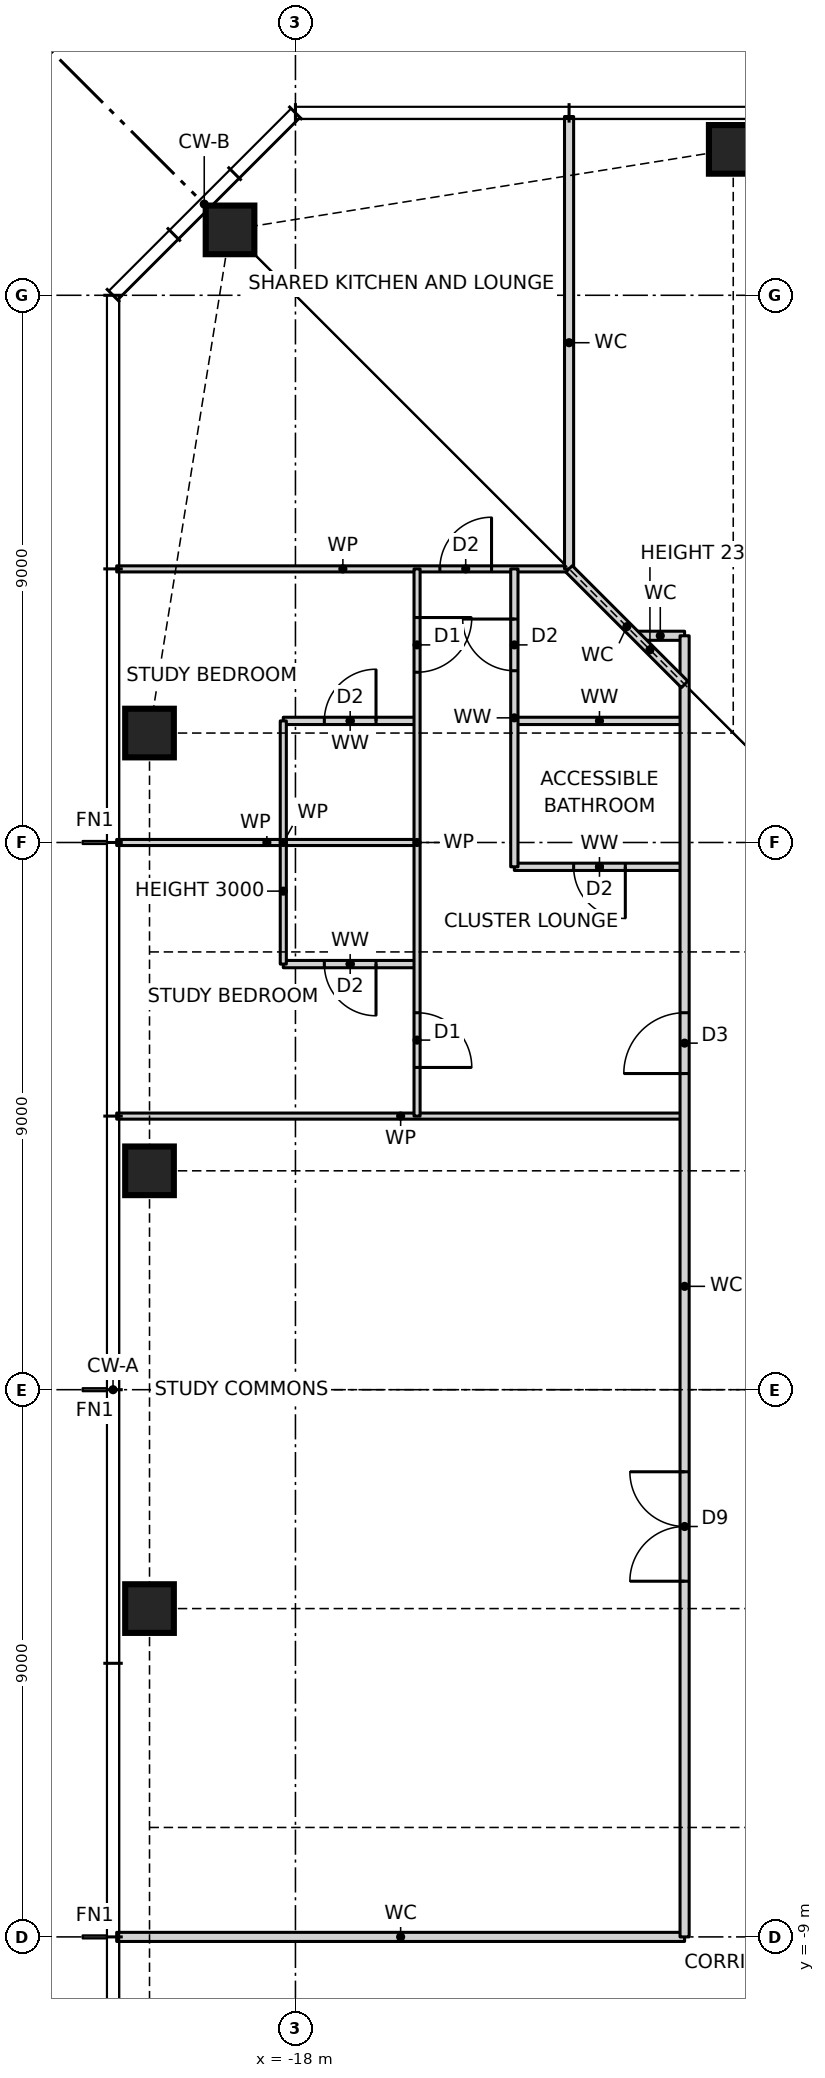
"""IFC4 building model, lengths in metres.
Left out: names, types, materials, properties, quantities, classifications, styles, units other than length and angle.
Written with IfcOpenShell. Run it as: python <this file> out.ifc"""

import sys

from ifc_helpers import new_model, si_unit, direction, frame, frame_2d, origin, origin_2d, place, context, subcontext, project, spatial, rectangle, hollow_rectangle, extrude, element, fill, save


model = new_model("IFC4")
c1 = context("Model", 3, precision=1e-05, world=origin(), true_north=direction((0.0, 1.0)))
c2 = subcontext(c1, "Body", "Model", "MODEL_VIEW")
j1 = project(units=[si_unit("LENGTHUNIT", "METRE"), si_unit("PLANEANGLEUNIT", "RADIAN")], contexts=[c1])
p1 = place(None, origin())
s1 = spatial("IfcSite", under=j1, at=p1, CompositionType="ELEMENT")
p2 = place(p1, origin())
s2 = spatial("IfcBuilding", under=s1, at=p2, CompositionType="ELEMENT")
p3 = place(p2, frame((0.0, 0.0, 122.5)))
s3 = spatial("IfcBuildingStorey", under=s2, at=p3, CompositionType="ELEMENT", Elevation=122.5)
for number, where, z_axis, x_axis in (
    (1, (-10.8, 20.4, 0.0), (0.0, 0.0, 1.0), (1.0, 0.0, 0.0)),
    (2, (-19.076, 19.076, 0.0), (0.0, 0.0, 1.0), (1.0, 0.0, 0.0)),
    (3, (-20.4, 10.8, 0.0), (0.0, 0.0, 1.0), (1.0, 0.0, 0.0)),
    (4, (-20.4, 3.6, 0.0), (0.0, 0.0, 1.0), (1.0, 0.0, 0.0)),
    (5, (-20.4, -3.6, 0.0), (0.0, 0.0, 1.0), (1.0, 0.0, 0.0)),
):
    element("IfcColumn", number, at=place(p3, frame(where, z_axis=z_axis, x_axis=x_axis)), inside=s3, PredefinedType="COLUMN", context=c2, shape_type="SweptSolid", body=[
        extrude(hollow_rectangle(XDim=0.8, YDim=0.8, WallThickness=0.07, at=origin_2d()), origin(), (0.0, 0.0, 1.0), 3.5),
    ])
p4 = place(p3, frame((-20.94, -9.0, 0.0), z_axis=(0.0, 0.0, 1.0), x_axis=(1.0, 0.0, 0.0)))
e6 = element("IfcWall", 6, at=p4, inside=s3, PredefinedType="PARTITIONING", context=c2, shape_type="SweptSolid", body=[
    extrude(rectangle(XDim=9.34, YDim=0.15, at=frame_2d((4.67, 0.0))), origin(), (0.0, 0.0, 1.0), 3.27),
])
p5 = place(p3, frame((-20.94, 4.5, 0.0), z_axis=(0.0, 0.0, 1.0), x_axis=(1.0, 0.0, 0.0)))
e7 = element("IfcWall", 7, at=p5, inside=s3, PredefinedType="PARTITIONING", context=c2, shape_type="SweptSolid", body=[
    extrude(rectangle(XDim=9.34, YDim=0.1, at=frame_2d((4.67, 0.0))), origin(), (0.0, 0.0, 1.0), 3.27),
])
p6 = place(p3, frame((-18.2, 7.0, 0.0), z_axis=(0.0, 0.0, 1.0), x_axis=(1.0, 0.0, 0.0)))
e8 = element("IfcWall", 8, at=p6, inside=s3, PredefinedType="PARTITIONING", context=c2, shape_type="SweptSolid", body=[
    extrude(rectangle(XDim=2.2, YDim=0.12, at=frame_2d((1.1, 0.0))), origin(), (0.0, 0.0, 1.0), 3.27),
])
p7 = place(p6, frame((0.675, 0.0, 0.0)))
e9 = element("IfcOpeningElement", 9, at=p7, cuts=e8, PredefinedType="OPENING", context=c2, shape_type="SweptSolid", body=[
    extrude(rectangle(XDim=0.85, YDim=2.1, at=frame_2d((0.425, 1.05))), frame((0.0, 0.07, 0.0), z_axis=(0.0, -1.0, 0.0), x_axis=(1.0, 0.0, 0.0)), (0.0, 0.0, 1.0), 0.14),
])
p8 = place(p3, frame((-14.4, 8.6, 0.0), z_axis=(0.0, 0.0, 1.0), x_axis=(1.0, 0.0, 0.0)))
e10 = element("IfcWall", 10, at=p8, inside=s3, PredefinedType="PARTITIONING", context=c2, shape_type="SweptSolid", body=[
    extrude(rectangle(XDim=2.8, YDim=0.12, at=frame_2d((1.4, 0.0))), origin(), (0.0, 0.0, 1.0), 3.27),
])
p9 = place(p8, frame((0.975, 0.0, 0.0)))
e11 = element("IfcOpeningElement", 11, at=p9, cuts=e10, PredefinedType="OPENING", context=c2, shape_type="SweptSolid", body=[
    extrude(rectangle(XDim=0.85, YDim=2.1, at=frame_2d((0.425, 1.05))), frame((0.0, 0.07, 0.0), z_axis=(0.0, -1.0, 0.0), x_axis=(1.0, 0.0, 0.0)), (0.0, 0.0, 1.0), 0.14),
])
p10 = place(p3, frame((-20.94, 9.0, 0.0), z_axis=(0.0, 0.0, 1.0), x_axis=(1.0, 0.0, 0.0)))
e12 = element("IfcWall", 12, at=p10, inside=s3, PredefinedType="PARTITIONING", context=c2, shape_type="SweptSolid", body=[
    extrude(rectangle(XDim=4.94, YDim=0.1, at=frame_2d((2.47, 0.0))), origin(), (0.0, 0.0, 1.0), 3.27),
])
p11 = place(p3, frame((-18.2, 11.0, 0.0), z_axis=(0.0, 0.0, 1.0), x_axis=(1.0, 0.0, 0.0)))
e13 = element("IfcWall", 13, at=p11, inside=s3, PredefinedType="PARTITIONING", context=c2, shape_type="SweptSolid", body=[
    extrude(rectangle(XDim=2.2, YDim=0.12, at=frame_2d((1.1, 0.0))), origin(), (0.0, 0.0, 1.0), 3.27),
])
p12 = place(p11, frame((0.675, 0.0, 0.0)))
e14 = element("IfcOpeningElement", 14, at=p12, cuts=e13, PredefinedType="OPENING", context=c2, shape_type="SweptSolid", body=[
    extrude(rectangle(XDim=0.85, YDim=2.1, at=frame_2d((0.425, 1.05))), frame((0.0, 0.07, 0.0), z_axis=(0.0, -1.0, 0.0), x_axis=(1.0, 0.0, 0.0)), (0.0, 0.0, 1.0), 0.14),
])
p13 = place(p3, frame((-14.4, 11.0, 0.0), z_axis=(0.0, 0.0, 1.0), x_axis=(1.0, 0.0, 0.0)))
e15 = element("IfcWall", 15, at=p13, inside=s3, PredefinedType="PARTITIONING", context=c2, shape_type="SweptSolid", body=[
    extrude(rectangle(XDim=2.8, YDim=0.12, at=frame_2d((1.4, 0.0))), origin(), (0.0, 0.0, 1.0), 3.27),
])
p14 = place(p3, frame((-12.4, 12.4, 0.0), z_axis=(0.0, 0.0, 1.0), x_axis=(1.0, 0.0, 0.0)))
e16 = element("IfcWall", 16, at=p14, inside=s3, PredefinedType="PARTITIONING", context=c2, shape_type="SweptSolid", body=[
    extrude(rectangle(XDim=0.8, YDim=0.15, at=frame_2d((0.4, 0.0))), origin(), (0.0, 0.0, 1.0), 3.27),
])
p15 = place(p3, frame((-20.94, 13.5, 0.0), z_axis=(0.0, 0.0, 1.0), x_axis=(1.0, 0.0, 0.0)))
e17 = element("IfcWall", 17, at=p15, inside=s3, PredefinedType="PARTITIONING", context=c2, shape_type="SweptSolid", body=[
    extrude(rectangle(XDim=7.44, YDim=0.1, at=frame_2d((3.72, 0.0))), origin(), (0.0, 0.0, 1.0), 3.27),
])
p16 = place(p15, frame((5.315, 0.0, 0.0)))
e18 = element("IfcOpeningElement", 18, at=p16, cuts=e17, PredefinedType="OPENING", context=c2, shape_type="SweptSolid", body=[
    extrude(rectangle(XDim=0.85, YDim=2.1, at=frame_2d((0.425, 1.05))), frame((0.0, 0.06, 0.0), z_axis=(0.0, -1.0, 0.0), x_axis=(1.0, 0.0, 0.0)), (0.0, 0.0, 1.0), 0.12),
])
p17 = place(p3, frame((-11.6, -9.0, 0.0), z_axis=(0.0, 0.0, 1.0), x_axis=(0.0, 1.0, 0.0)))
e19 = element("IfcWall", 19, at=p17, inside=s3, PredefinedType="PARTITIONING", context=c2, shape_type="SweptSolid", body=[
    extrude(rectangle(XDim=21.4, YDim=0.15, at=frame_2d((10.7, 0.0))), origin(), (0.0, 0.0, 1.0), 3.27),
])
p18 = place(p17, frame((14.2, 0.0, 0.0)))
e20 = element("IfcOpeningElement", 20, at=p18, cuts=e19, PredefinedType="OPENING", context=c2, shape_type="SweptSolid", body=[
    extrude(rectangle(XDim=1.0, YDim=2.1, at=frame_2d((0.5, 1.05))), frame((0.0, 0.085, 0.0), z_axis=(0.0, -1.0, 0.0), x_axis=(1.0, 0.0, 0.0)), (0.0, 0.0, 1.0), 0.17),
])
p19 = place(p17, frame((5.85, 0.0, 0.0)))
e21 = element("IfcOpeningElement", 21, at=p19, cuts=e19, PredefinedType="OPENING", context=c2, shape_type="SweptSolid", body=[
    extrude(rectangle(XDim=1.8, YDim=2.1, at=frame_2d((0.9, 1.05))), frame((0.0, 0.085, 0.0), z_axis=(0.0, -1.0, 0.0), x_axis=(1.0, 0.0, 0.0)), (0.0, 0.0, 1.0), 0.17),
])
p20 = place(p3, frame((-13.5, 13.5, 0.0), z_axis=(0.0, 0.0, 1.0), x_axis=(0.0, 1.0, 0.0)))
e22 = element("IfcWall", 22, at=p20, inside=s3, PredefinedType="PARTITIONING", context=c2, shape_type="SweptSolid", body=[
    extrude(rectangle(XDim=7.44, YDim=0.15, at=frame_2d((3.72, 0.0))), origin(), (0.0, 0.0, 1.0), 3.27),
])
p21 = place(p3, frame((-14.4, 8.6, 0.0), z_axis=(0.0, 0.0, 1.0), x_axis=(0.0, 1.0, 0.0)))
e23 = element("IfcWall", 23, at=p21, inside=s3, PredefinedType="PARTITIONING", context=c2, shape_type="SweptSolid", body=[
    extrude(rectangle(XDim=4.9, YDim=0.12, at=frame_2d((2.45, 0.0))), origin(), (0.0, 0.0, 1.0), 3.27),
])
p22 = place(p21, frame((3.225, 0.0, 0.0)))
e24 = element("IfcOpeningElement", 24, at=p22, cuts=e23, PredefinedType="OPENING", context=c2, shape_type="SweptSolid", body=[
    extrude(rectangle(XDim=0.85, YDim=2.1, at=frame_2d((0.425, 1.05))), frame((0.0, 0.07, 0.0), z_axis=(0.0, -1.0, 0.0), x_axis=(1.0, 0.0, 0.0)), (0.0, 0.0, 1.0), 0.14),
])
p23 = place(p3, frame((-16.0, 4.5, 0.0), z_axis=(0.0, 0.0, 1.0), x_axis=(0.0, 1.0, 0.0)))
e25 = element("IfcWall", 25, at=p23, inside=s3, PredefinedType="PARTITIONING", context=c2, shape_type="SweptSolid", body=[
    extrude(rectangle(XDim=9.0, YDim=0.1, at=frame_2d((4.5, 0.0))), origin(), (0.0, 0.0, 1.0), 3.27),
])
p24 = place(p23, frame((7.3, 0.0, 0.0)))
e26 = element("IfcOpeningElement", 26, at=p24, cuts=e25, PredefinedType="OPENING", context=c2, shape_type="SweptSolid", body=[
    extrude(rectangle(XDim=0.9, YDim=2.1, at=frame_2d((0.45, 1.05))), frame((0.0, 0.06, 0.0), z_axis=(0.0, -1.0, 0.0), x_axis=(1.0, 0.0, 0.0)), (0.0, 0.0, 1.0), 0.12),
])
p25 = place(p23, frame((0.8, 0.0, 0.0)))
e27 = element("IfcOpeningElement", 27, at=p25, cuts=e25, PredefinedType="OPENING", context=c2, shape_type="SweptSolid", body=[
    extrude(rectangle(XDim=0.9, YDim=2.1, at=frame_2d((0.45, 1.05))), frame((0.0, 0.06, 0.0), z_axis=(0.0, -1.0, 0.0), x_axis=(1.0, 0.0, 0.0)), (0.0, 0.0, 1.0), 0.12),
])
p26 = place(p3, frame((-18.2, 7.0, 0.0), z_axis=(0.0, 0.0, 1.0), x_axis=(0.0, 1.0, 0.0)))
e28 = element("IfcWall", 28, at=p26, inside=s3, PredefinedType="PARTITIONING", context=c2, shape_type="SweptSolid", body=[
    extrude(rectangle(XDim=4.0, YDim=0.1, at=frame_2d((2.0, 0.0))), origin(), (0.0, 0.0, 1.0), 3.0),
])
p27 = place(p3, frame((-11.6, 11.6, 0.0), z_axis=(0.0, 0.0, 1.0), x_axis=(-0.707106781187, 0.707106781187, 0.0)))
e29 = element("IfcWall", 29, at=p27, inside=s3, PredefinedType="PARTITIONING", context=c2, shape_type="SweptSolid", body=[
    extrude(rectangle(XDim=2.687, YDim=0.15, at=frame_2d((1.343, 0.0))), origin(), (0.0, 0.0, 1.0), 2.343),
])
p28 = place(p12, origin())
e30 = element("IfcDoor", 30, at=p28, inside=s3, OperationType="SINGLE_SWING_RIGHT", PredefinedType="DOOR", context=c2, shape_type="SweptSolid", body=[
    extrude(rectangle(XDim=0.85, YDim=2.1, at=frame_2d((0.425, 1.05))), frame((0.0, 0.025, 0.0), z_axis=(0.0, -1.0, 0.0), x_axis=(1.0, 0.0, 0.0)), (0.0, 0.0, 1.0), 0.05),
])
fill(e14, e30)
p29 = place(p24, frame((0.9, 0.0, 0.0), z_axis=(0.0, 0.0, 1.0), x_axis=(-1.0, 0.0, 0.0)))
e31 = element("IfcDoor", 31, at=p29, inside=s3, OperationType="SINGLE_SWING_LEFT", PredefinedType="DOOR", context=c2, shape_type="SweptSolid", body=[
    extrude(rectangle(XDim=0.9, YDim=2.1, at=frame_2d((0.45, 1.05))), frame((0.0, 0.025, 0.0), z_axis=(0.0, -1.0, 0.0), x_axis=(1.0, 0.0, 0.0)), (0.0, 0.0, 1.0), 0.05),
])
fill(e26, e31)
p30 = place(p7, frame((0.85, 0.0, 0.0), z_axis=(0.0, 0.0, 1.0), x_axis=(-1.0, 0.0, 0.0)))
e32 = element("IfcDoor", 32, at=p30, inside=s3, OperationType="SINGLE_SWING_LEFT", PredefinedType="DOOR", context=c2, shape_type="SweptSolid", body=[
    extrude(rectangle(XDim=0.85, YDim=2.1, at=frame_2d((0.425, 1.05))), frame((0.0, 0.025, 0.0), z_axis=(0.0, -1.0, 0.0), x_axis=(1.0, 0.0, 0.0)), (0.0, 0.0, 1.0), 0.05),
])
fill(e9, e32)
p31 = place(p25, frame((0.9, 0.0, 0.0), z_axis=(0.0, 0.0, 1.0), x_axis=(-1.0, 0.0, 0.0)))
e33 = element("IfcDoor", 33, at=p31, inside=s3, OperationType="SINGLE_SWING_RIGHT", PredefinedType="DOOR", context=c2, shape_type="SweptSolid", body=[
    extrude(rectangle(XDim=0.9, YDim=2.1, at=frame_2d((0.45, 1.05))), frame((0.0, 0.025, 0.0), z_axis=(0.0, -1.0, 0.0), x_axis=(1.0, 0.0, 0.0)), (0.0, 0.0, 1.0), 0.05),
])
fill(e27, e33)
p32 = place(p18, origin())
e34 = element("IfcDoor", 34, at=p32, inside=s3, OperationType="SINGLE_SWING_LEFT", PredefinedType="DOOR", context=c2, shape_type="SweptSolid", body=[
    extrude(rectangle(XDim=1.0, YDim=2.1, at=frame_2d((0.5, 1.05))), frame((0.0, 0.025, 0.0), z_axis=(0.0, -1.0, 0.0), x_axis=(1.0, 0.0, 0.0)), (0.0, 0.0, 1.0), 0.05),
])
fill(e20, e34)
p33 = place(p22, origin())
e35 = element("IfcDoor", 35, at=p33, inside=s3, OperationType="SINGLE_SWING_RIGHT", PredefinedType="DOOR", context=c2, shape_type="SweptSolid", body=[
    extrude(rectangle(XDim=0.85, YDim=2.1, at=frame_2d((0.425, 1.05))), frame((0.0, 0.025, 0.0), z_axis=(0.0, -1.0, 0.0), x_axis=(1.0, 0.0, 0.0)), (0.0, 0.0, 1.0), 0.05),
])
fill(e24, e35)
p34 = place(p9, frame((0.85, 0.0, 0.0), z_axis=(0.0, 0.0, 1.0), x_axis=(-1.0, 0.0, 0.0)))
e36 = element("IfcDoor", 36, at=p34, inside=s3, OperationType="SINGLE_SWING_LEFT", PredefinedType="DOOR", context=c2, shape_type="SweptSolid", body=[
    extrude(rectangle(XDim=0.85, YDim=2.1, at=frame_2d((0.425, 1.05))), frame((0.0, 0.025, 0.0), z_axis=(0.0, -1.0, 0.0), x_axis=(1.0, 0.0, 0.0)), (0.0, 0.0, 1.0), 0.05),
])
fill(e11, e36)
p35 = place(p19, origin())
e37 = element("IfcDoor", 37, at=p35, inside=s3, OperationType="DOUBLE_DOOR_SINGLE_SWING", PredefinedType="DOOR", context=c2, shape_type="SweptSolid", body=[
    extrude(rectangle(XDim=1.8, YDim=2.1, at=frame_2d((0.9, 1.05))), frame((0.0, 0.025, 0.0), z_axis=(0.0, -1.0, 0.0), x_axis=(1.0, 0.0, 0.0)), (0.0, 0.0, 1.0), 0.05),
])
fill(e21, e37)
p36 = place(p16, origin())
e38 = element("IfcDoor", 38, at=p36, inside=s3, OperationType="SINGLE_SWING_RIGHT", PredefinedType="DOOR", context=c2, shape_type="SweptSolid", body=[
    extrude(rectangle(XDim=0.85, YDim=2.1, at=frame_2d((0.425, 1.05))), frame((0.0, 0.025, 0.0), z_axis=(0.0, -1.0, 0.0), x_axis=(1.0, 0.0, 0.0)), (0.0, 0.0, 1.0), 0.05),
])
fill(e18, e38)
save(model, sys.argv[1])
